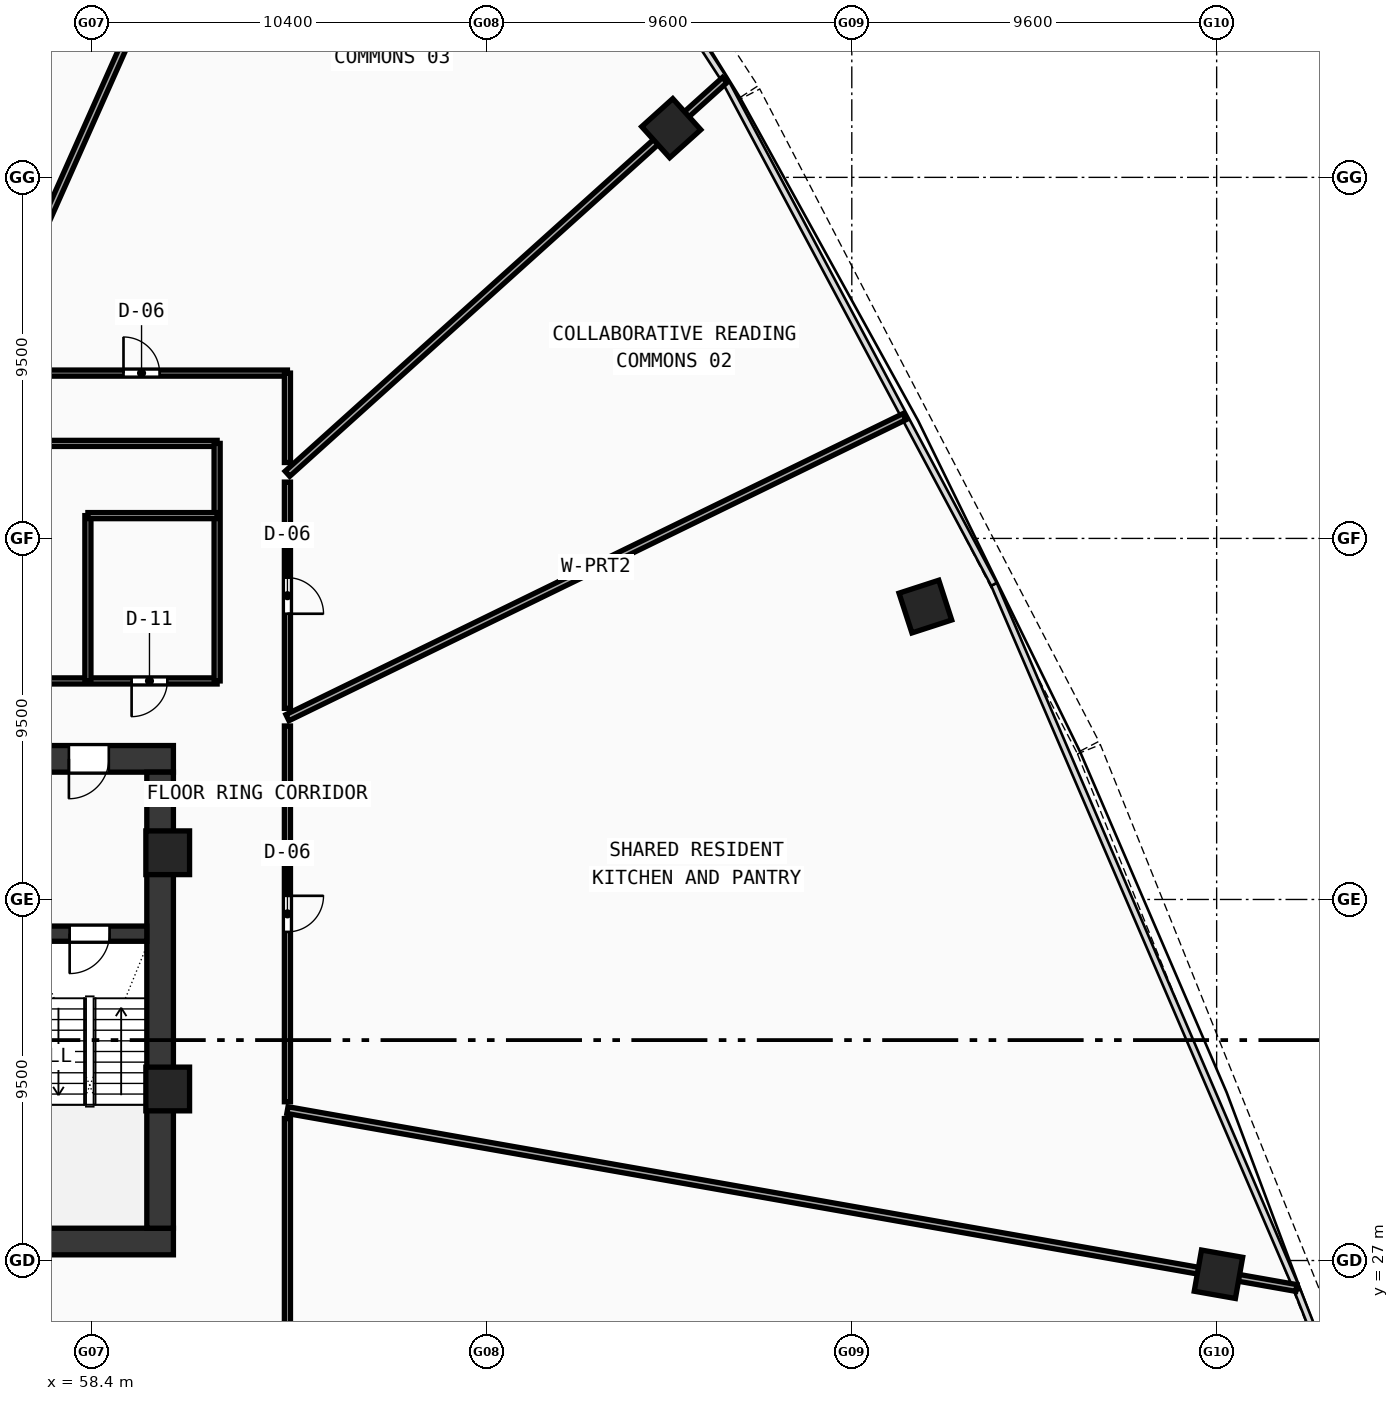
"""IFC4 building model, lengths in metres.
Left out: names, types, materials, properties, quantities, classifications, styles, units other than length and angle.
Written with IfcOpenShell. Run it as: python <this file> out.ifc"""

import sys

from ifc_helpers import new_model, si_unit, direction, frame, frame_2d, origin, origin_with_axes, origin_2d, place, context, subcontext, project, spatial, rectangle, hollow_rectangle, extrude, source, transform, mapped, element, fill, save


model = new_model("IFC4")
c1 = context("Model", 3, precision=1e-05, world=origin(), true_north=direction((0.0, 1.0)))
c2 = subcontext(c1, "Body", "Model", "MODEL_VIEW")
j1 = project(units=[si_unit("LENGTHUNIT", "METRE"), si_unit("PLANEANGLEUNIT", "RADIAN")], contexts=[c1])
p1 = place(None, origin())
s1 = spatial("IfcSite", under=j1, at=p1, CompositionType="ELEMENT")
p2 = place(p1, origin())
s2 = spatial("IfcBuilding", under=s1, at=p2, CompositionType="ELEMENT")
p3 = place(p2, frame((0.0, 0.0, 34.03)))
s3 = spatial("IfcBuildingStorey", under=s2, at=p3, CompositionType="ELEMENT", Elevation=34.03)
p4 = place(p3, frame((35.45, 27.5, 0.0), z_axis=(0.0, 0.0, 1.0), x_axis=(1.0, 0.0, 0.0)))
e1 = element("IfcWall", 1, at=p4, inside=s3, PredefinedType="SHEAR", context=c2, shape_type="SweptSolid", body=[
    extrude(rectangle(XDim=25.1, YDim=0.7, at=frame_2d((12.55, 0.0))), origin(), (0.0, 0.0, 1.0), 3.37),
])
p5 = place(p3, frame((49.2, 40.2, 0.0), z_axis=(0.0, 0.0, 1.0), x_axis=(1.0, 0.0, 0.0)))
e2 = element("IfcWall", 2, at=p5, inside=s3, PredefinedType="SHEAR", context=c2, shape_type="SweptSolid", body=[
    extrude(rectangle(XDim=11.35, YDim=0.7, at=frame_2d((5.675, 0.0))), origin(), (0.0, 0.0, 1.0), 3.37),
])
p6 = place(p5, frame((8.6, 0.0, 0.0)))
e3 = element("IfcOpeningElement", 3, at=p6, cuts=e2, PredefinedType="OPENING", context=c2, shape_type="SweptSolid", body=[
    extrude(rectangle(XDim=1.05, YDim=2.1, at=frame_2d((0.525, 1.05))), frame((0.0, 0.36, 0.0), z_axis=(0.0, -1.0, 0.0), x_axis=(1.0, 0.0, 0.0)), (0.0, 0.0, 1.0), 0.72),
])
p7 = place(p3, frame((60.2, 27.85, 0.0), z_axis=(0.0, 0.0, 1.0), x_axis=(0.0, 1.0, 0.0)))
e4 = element("IfcWall", 4, at=p7, inside=s3, PredefinedType="SHEAR", context=c2, shape_type="SweptSolid", body=[
    extrude(rectangle(XDim=12.0, YDim=0.7, at=frame_2d((6.0, 0.0))), origin(), (0.0, 0.0, 1.0), 3.37),
])
p8 = place(p3, frame((56.8, 35.6, 0.0), z_axis=(0.0, 0.0, 1.0), x_axis=(1.0, 0.0, 0.0)))
e5 = element("IfcWall", 5, at=p8, inside=s3, PredefinedType="SHEAR", context=c2, shape_type="SweptSolid", body=[
    extrude(rectangle(XDim=3.05, YDim=0.4, at=frame_2d((1.525, 0.0))), origin(), (0.0, 0.0, 1.0), 3.37),
])
p9 = place(p8, frame((1.02, 0.0, 0.0)))
e6 = element("IfcOpeningElement", 6, at=p9, cuts=e5, PredefinedType="OPENING", context=c2, shape_type="SweptSolid", body=[
    extrude(rectangle(XDim=1.05, YDim=2.1, at=frame_2d((0.525, 1.05))), frame((0.0, 0.21, 0.0), z_axis=(0.0, -1.0, 0.0), x_axis=(1.0, 0.0, 0.0)), (0.0, 0.0, 1.0), 0.42),
])
m1 = source(origin(), c2, "Body", "SweptSolid", [
    extrude(hollow_rectangle(XDim=1.15, YDim=1.15, WallThickness=0.048, at=origin_2d()), origin(), (0.0, 0.0, 1.0), 3.63),
])
for number, where, z_axis, x_axis in (
    (7, (60.4, 31.513, -0.26), (0.0, 0.0, 1.0), (1.0, 0.0, 0.0)),
    (8, (60.4, 37.729, -0.26), (0.0, 0.0, 1.0), (1.0, 0.0, 0.0)),
):
    element("IfcColumn", number, at=place(p3, frame(where, z_axis=z_axis, x_axis=x_axis)), inside=s3, PredefinedType="COLUMN", context=c2, shape_type="MappedRepresentation", body=[
        mapped(m1, transform((0.0, 0.0, 0.0), scale=1.0)),
    ])
m2 = source(origin(), c2, "Body", "SweptSolid", [
    extrude(hollow_rectangle(XDim=1.1, YDim=1.1, WallThickness=0.045, at=origin_2d()), origin(), (0.0, 0.0, 1.0), 3.63),
])
for number, where, z_axis, x_axis in (
    (9, (88.048, 26.638, -0.26), (0.0, 0.0, 1.0), (0.174, 0.985, 0.0)),
    (10, (80.335, 44.206, -0.26), (0.0, 0.0, 1.0), (-0.309, 0.951, 0.0)),
    (11, (73.649, 56.794, -0.26), (0.0, 0.0, 1.0), (-0.669, 0.743, 0.0)),
):
    element("IfcColumn", number, at=place(p3, frame(where, z_axis=z_axis, x_axis=x_axis)), inside=s3, PredefinedType="COLUMN", context=c2, shape_type="MappedRepresentation", body=[
        mapped(m2, transform((0.0, 0.0, 0.0), scale=1.0)),
    ])
p10 = place(p3, frame((45.92, 42.25, 0.0), z_axis=(0.0, 0.0, 1.0), x_axis=(1.0, 0.0, 0.0)))
e12 = element("IfcWall", 12, at=p10, inside=s3, PredefinedType="PARTITIONING", context=c2, shape_type="SweptSolid", body=[
    extrude(rectangle(XDim=15.78, YDim=0.16, at=frame_2d((7.89, 0.0))), origin(), (0.0, 0.0, 1.0), 2.67),
])
p11 = place(p10, frame((2.1, 0.0, 0.0)))
e13 = element("IfcOpeningElement", 13, at=p11, cuts=e12, PredefinedType="OPENING", context=c2, shape_type="SweptSolid", body=[
    extrude(rectangle(XDim=0.92, YDim=2.1, at=frame_2d((0.46, 1.05))), frame((0.0, 0.09, 0.0), z_axis=(0.0, -1.0, 0.0), x_axis=(1.0, 0.0, 0.0)), (0.0, 0.0, 1.0), 0.18),
])
p12 = place(p10, frame((13.53, 0.0, 0.0)))
e14 = element("IfcOpeningElement", 14, at=p12, cuts=e12, PredefinedType="OPENING", context=c2, shape_type="SweptSolid", body=[
    extrude(rectangle(XDim=0.94, YDim=2.1, at=frame_2d((0.47, 1.05))), frame((0.0, 0.09, 0.0), z_axis=(0.0, -1.0, 0.0), x_axis=(1.0, 0.0, 0.0)), (0.0, 0.0, 1.0), 0.18),
])
p13 = place(p3, frame((45.92, 48.5, 0.0), z_axis=(0.0, 0.0, 1.0), x_axis=(1.0, 0.0, 0.0)))
e15 = element("IfcWall", 15, at=p13, inside=s3, PredefinedType="PARTITIONING", context=c2, shape_type="SweptSolid", body=[
    extrude(rectangle(XDim=15.78, YDim=0.16, at=frame_2d((7.89, 0.0))), origin(), (0.0, 0.0, 1.0), 2.67),
])
p14 = place(p3, frame((61.7, 42.25, 0.0), z_axis=(0.0, 0.0, 1.0), x_axis=(0.0, 1.0, 0.0)))
e16 = element("IfcWall", 16, at=p14, inside=s3, PredefinedType="PARTITIONING", context=c2, shape_type="SweptSolid", body=[
    extrude(rectangle(XDim=6.25, YDim=0.16, at=frame_2d((3.125, 0.0))), origin(), (0.0, 0.0, 1.0), 2.67),
])
p15 = place(p3, frame((58.3, 42.25, 0.0), z_axis=(0.0, 0.0, 1.0), x_axis=(0.0, 1.0, 0.0)))
e17 = element("IfcWall", 17, at=p15, inside=s3, PredefinedType="PARTITIONING", context=c2, shape_type="SweptSolid", body=[
    extrude(rectangle(XDim=4.35, YDim=0.16, at=frame_2d((2.175, 0.0))), origin(), (0.0, 0.0, 1.0), 2.67),
])
p16 = place(p3, frame((58.3, 46.6, 0.0), z_axis=(0.0, 0.0, 1.0), x_axis=(1.0, 0.0, 0.0)))
e18 = element("IfcWall", 18, at=p16, inside=s3, PredefinedType="PARTITIONING", context=c2, shape_type="SweptSolid", body=[
    extrude(rectangle(XDim=3.4, YDim=0.16, at=frame_2d((1.7, 0.0))), origin(), (0.0, 0.0, 1.0), 2.97),
])
p17 = place(p3, frame((63.55, 41.284, 0.0), z_axis=(0.0, 0.0, 1.0), x_axis=(0.898792344086, 0.438374636825, 0.0)))
e19 = element("IfcWall", 19, at=p17, inside=s3, PredefinedType="PARTITIONING", context=c2, shape_type="SweptSolid", body=[
    extrude(rectangle(XDim=18.064, YDim=0.18, at=frame_2d((9.032, 0.0))), origin(), (0.0, 0.0, 1.0), 2.67),
])
p18 = place(p3, frame((63.55, 47.701, 0.0), z_axis=(0.0, 0.0, 1.0), x_axis=(0.743145159556, 0.669130235326, 0.0)))
e20 = element("IfcWall", 20, at=p18, inside=s3, PredefinedType="PARTITIONING", context=c2, shape_type="SweptSolid", body=[
    extrude(rectangle(XDim=15.483, YDim=0.18, at=frame_2d((7.742, 0.0))), origin(), (0.0, 0.0, 1.0), 2.67),
])
p19 = place(p3, frame((55.413, 50.35, 0.0), z_axis=(0.0, 0.0, 1.0), x_axis=(0.406741199867, 0.913543428815, 0.0)))
e21 = element("IfcWall", 21, at=p19, inside=s3, PredefinedType="PARTITIONING", context=c2, shape_type="SweptSolid", body=[
    extrude(rectangle(XDim=24.65, YDim=0.18, at=frame_2d((12.325, 0.0))), origin(), (0.0, 0.0, 1.0), 2.67),
])
p20 = place(p3, frame((63.55, 30.958, 0.0), z_axis=(0.0, 0.0, 1.0), x_axis=(0.984807983054, -0.17364687303, 0.0)))
e22 = element("IfcWall", 22, at=p20, inside=s3, PredefinedType="PARTITIONING", context=c2, shape_type="SweptSolid", body=[
    extrude(rectangle(XDim=26.958, YDim=0.18, at=frame_2d((13.479, 0.0))), origin(), (0.0, 0.0, 1.0), 2.67),
])
p21 = place(p3, frame((55.654, 50.35, 0.0), z_axis=(0.0, 0.0, 1.0), x_axis=(1.0, 0.0, 0.0)))
e23 = element("IfcWall", 23, at=p21, inside=s3, PredefinedType="PARTITIONING", context=c2, shape_type="SweptSolid", body=[
    extrude(rectangle(XDim=7.896, YDim=0.16, at=frame_2d((3.948, 0.0))), origin(), (0.0, 0.0, 1.0), 2.97),
])
p22 = place(p21, frame((3.583, 0.0, 0.0)))
e24 = element("IfcOpeningElement", 24, at=p22, cuts=e23, PredefinedType="OPENING", context=c2, shape_type="SweptSolid", body=[
    extrude(rectangle(XDim=0.95, YDim=2.1, at=frame_2d((0.475, 1.05))), frame((0.0, 0.09, 0.0), z_axis=(0.0, -1.0, 0.0), x_axis=(1.0, 0.0, 0.0)), (0.0, 0.0, 1.0), 0.18),
])
p23 = place(p3, frame((63.55, 50.35, 0.0), z_axis=(0.0, 0.0, 1.0), x_axis=(0.0, -1.0, 0.0)))
e25 = element("IfcWall", 25, at=p23, inside=s3, PredefinedType="PARTITIONING", context=c2, shape_type="SweptSolid", body=[
    extrude(rectangle(XDim=2.353, YDim=0.16, at=frame_2d((1.176, 0.0))), origin(), (0.0, 0.0, 1.0), 3.37),
])
p24 = place(p3, frame((63.55, 47.482, 0.0), z_axis=(0.0, 0.0, 1.0), x_axis=(0.0, -1.0, 0.0)))
e26 = element("IfcWall", 26, at=p24, inside=s3, PredefinedType="PARTITIONING", context=c2, shape_type="SweptSolid", body=[
    extrude(rectangle(XDim=5.953, YDim=0.16, at=frame_2d((2.976, 0.0))), origin(), (0.0, 0.0, 1.0), 2.67),
])
p25 = place(p24, frame((2.514, 0.0, 0.0)))
e27 = element("IfcOpeningElement", 27, at=p25, cuts=e26, PredefinedType="OPENING", context=c2, shape_type="SweptSolid", body=[
    extrude(rectangle(XDim=0.95, YDim=2.1, at=frame_2d((0.475, 1.05))), frame((0.0, 0.09, 0.0), z_axis=(0.0, -1.0, 0.0), x_axis=(1.0, 0.0, 0.0)), (0.0, 0.0, 1.0), 0.18),
])
p26 = place(p3, frame((63.55, 41.064, 0.0), z_axis=(0.0, 0.0, 1.0), x_axis=(0.0, -1.0, 0.0)))
e28 = element("IfcWall", 28, at=p26, inside=s3, PredefinedType="PARTITIONING", context=c2, shape_type="SweptSolid", body=[
    extrude(rectangle(XDim=9.886, YDim=0.16, at=frame_2d((4.943, 0.0))), origin(), (0.0, 0.0, 1.0), 2.67),
])
p27 = place(p26, frame((4.468, 0.0, 0.0)))
e29 = element("IfcOpeningElement", 29, at=p27, cuts=e28, PredefinedType="OPENING", context=c2, shape_type="SweptSolid", body=[
    extrude(rectangle(XDim=0.95, YDim=2.1, at=frame_2d((0.475, 1.05))), frame((0.0, 0.09, 0.0), z_axis=(0.0, -1.0, 0.0), x_axis=(1.0, 0.0, 0.0)), (0.0, 0.0, 1.0), 0.18),
])
p28 = place(p3, frame((63.55, 30.735, 0.0), z_axis=(0.0, 0.0, 1.0), x_axis=(0.0, -1.0, 0.0)))
e30 = element("IfcWall", 30, at=p28, inside=s3, PredefinedType="PARTITIONING", context=c2, shape_type="SweptSolid", body=[
    extrude(rectangle(XDim=5.935, YDim=0.16, at=frame_2d((2.967, 0.0))), origin(), (0.0, 0.0, 1.0), 2.97),
])
m3 = source(origin(), c2, "Body", "SweptSolid", [
    extrude(rectangle(XDim=1.05, YDim=2.1, at=frame_2d((0.525, 1.05))), frame((0.0, 0.025, 0.0), z_axis=(0.0, -1.0, 0.0), x_axis=(1.0, 0.0, 0.0)), (0.0, 0.0, 1.0), 0.05),
])
p29 = place(p9, frame((1.05, 0.0, 0.0), z_axis=(0.0, 0.0, 1.0), x_axis=(-1.0, 0.0, 0.0)))
e31 = element("IfcDoor", 31, at=p29, inside=s3, OperationType="SINGLE_SWING_RIGHT", PredefinedType="DOOR", context=c2, shape_type="MappedRepresentation", body=[
    mapped(m3, transform((0.0, 0.0, 0.0), scale=1.0)),
])
fill(e6, e31)
p30 = place(p6, frame((1.05, 0.0, 0.0), z_axis=(0.0, 0.0, 1.0), x_axis=(-1.0, 0.0, 0.0)))
e32 = element("IfcDoor", 32, at=p30, inside=s3, OperationType="SINGLE_SWING_RIGHT", PredefinedType="DOOR", context=c2, shape_type="MappedRepresentation", body=[
    mapped(m3, transform((0.0, 0.0, 0.0), scale=1.0)),
])
fill(e3, e32)
m4 = source(origin(), c2, "Body", "SweptSolid", [
    extrude(rectangle(XDim=0.94, YDim=2.1, at=frame_2d((0.47, 1.05))), frame((0.0, 0.025, 0.0), z_axis=(0.0, -1.0, 0.0), x_axis=(1.0, 0.0, 0.0)), (0.0, 0.0, 1.0), 0.05),
])
p31 = place(p12, frame((0.94, 0.0, 0.0), z_axis=(0.0, 0.0, 1.0), x_axis=(-1.0, 0.0, 0.0)))
e33 = element("IfcDoor", 33, at=p31, inside=s3, OperationType="SINGLE_SWING_RIGHT", PredefinedType="DOOR", context=c2, shape_type="MappedRepresentation", body=[
    mapped(m4, transform((0.0, 0.0, 0.0), scale=1.0)),
])
fill(e14, e33)
m5 = source(origin(), c2, "Body", "SweptSolid", [
    extrude(rectangle(XDim=0.95, YDim=2.1, at=frame_2d((0.475, 1.05))), frame((0.0, 0.025, 0.0), z_axis=(0.0, -1.0, 0.0), x_axis=(1.0, 0.0, 0.0)), (0.0, 0.0, 1.0), 0.05),
])
p32 = place(p27, origin_with_axes())
e34 = element("IfcDoor", 34, at=p32, inside=s3, OperationType="SINGLE_SWING_LEFT", PredefinedType="DOOR", context=c2, shape_type="MappedRepresentation", body=[
    mapped(m5, transform((0.0, 0.0, 0.0), scale=1.0)),
])
fill(e29, e34)
p33 = place(p25, origin_with_axes())
e35 = element("IfcDoor", 35, at=p33, inside=s3, OperationType="SINGLE_SWING_RIGHT", PredefinedType="DOOR", context=c2, shape_type="MappedRepresentation", body=[
    mapped(m5, transform((0.0, 0.0, 0.0), scale=1.0)),
])
fill(e27, e35)
p34 = place(p22, origin_with_axes())
e36 = element("IfcDoor", 36, at=p34, inside=s3, OperationType="SINGLE_SWING_LEFT", PredefinedType="DOOR", context=c2, shape_type="MappedRepresentation", body=[
    mapped(m5, transform((0.0, 0.0, 0.0), scale=1.0)),
])
fill(e24, e36)
save(model, sys.argv[1])
